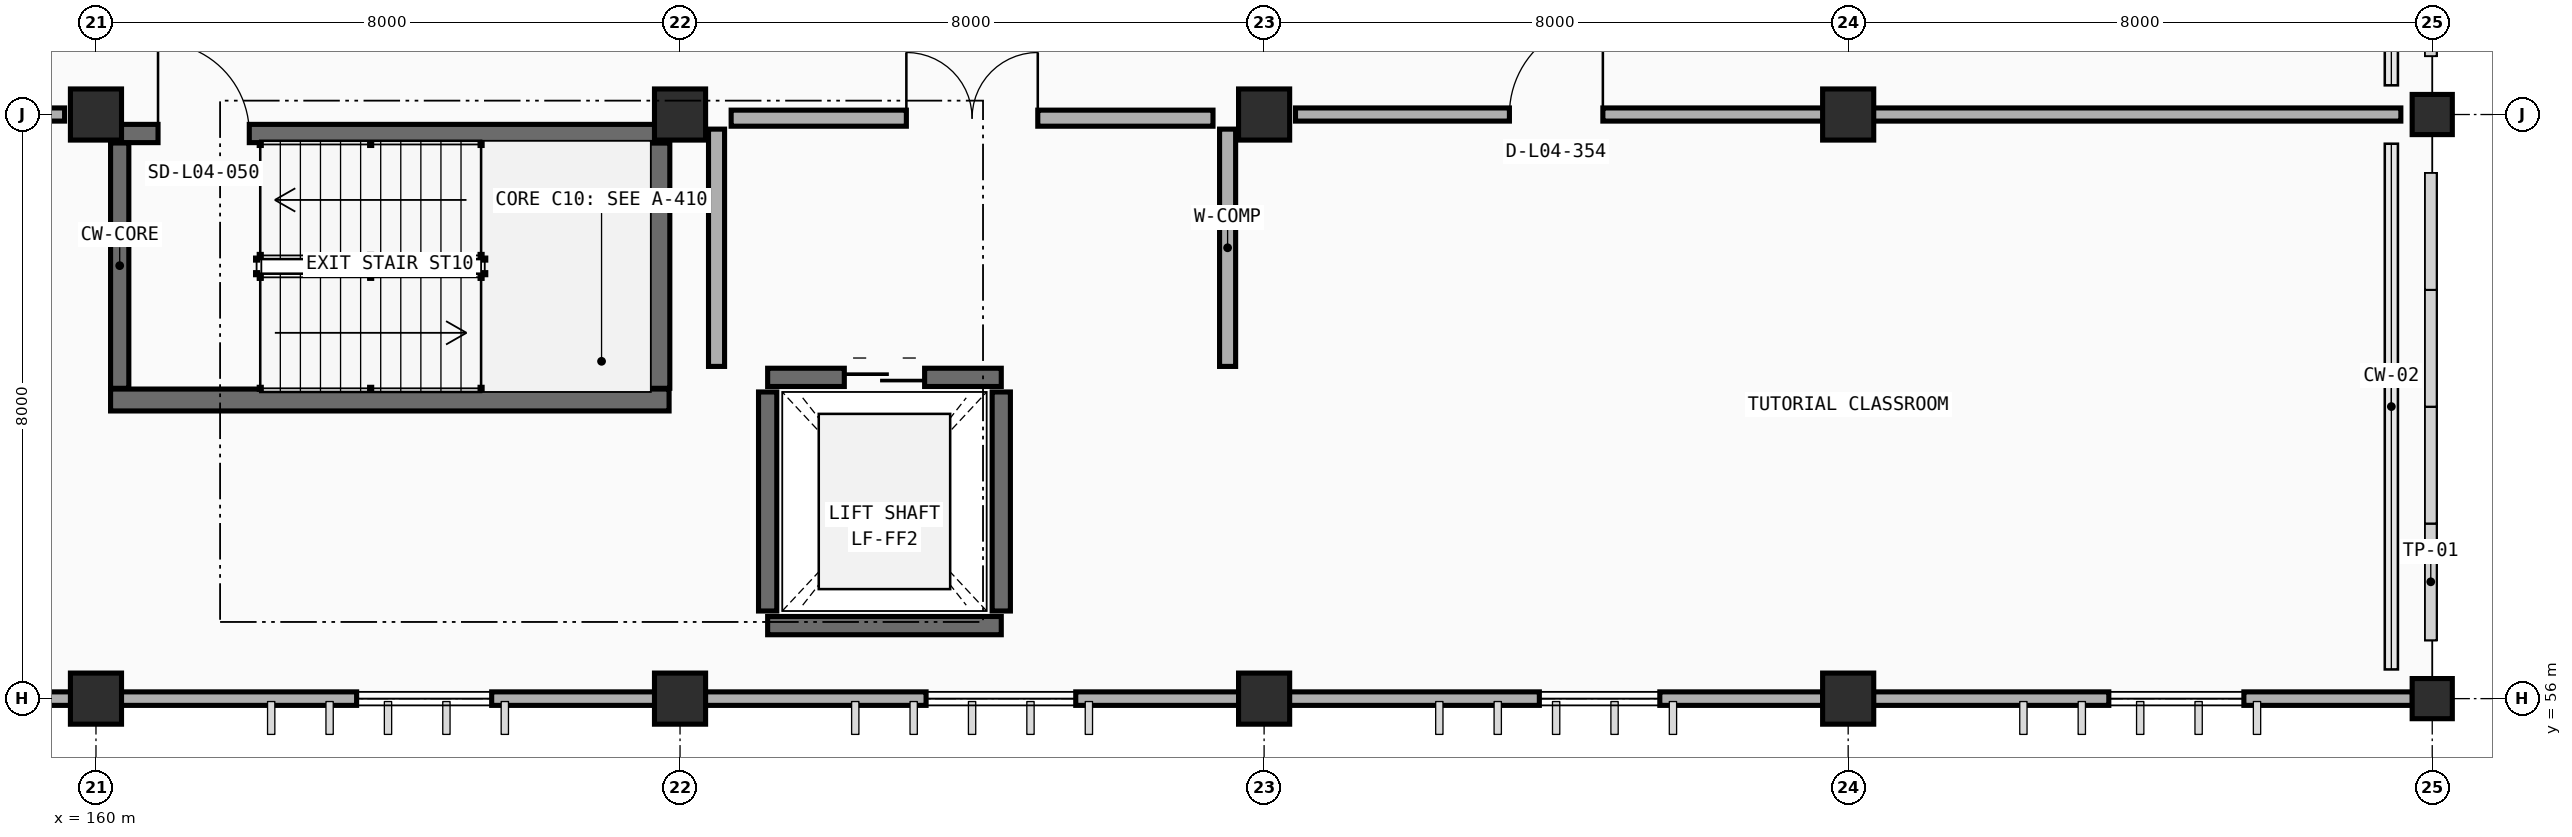
"""IFC4 building model, lengths in metres.
Left out: names, types, materials, properties, quantities, classifications, styles, units other than length and angle.
Written with IfcOpenShell. Run it as: python <this file> out.ifc"""

import sys

from ifc_helpers import new_model, si_unit, direction, frame, frame_2d, origin, origin_2d, place, context, subcontext, project, spatial, rectangle, extrude, element, fill, save


model = new_model("IFC4")
c1 = context("Model", 3, precision=1e-05, world=origin(), true_north=direction((0.0, 1.0)))
c2 = subcontext(c1, "Body", "Model", "MODEL_VIEW")
j1 = project(units=[si_unit("LENGTHUNIT", "METRE"), si_unit("PLANEANGLEUNIT", "RADIAN")], contexts=[c1])
p1 = place(None, origin())
s1 = spatial("IfcSite", under=j1, at=p1, CompositionType="ELEMENT")
p2 = place(p1, origin())
s2 = spatial("IfcBuilding", under=s1, at=p2, CompositionType="ELEMENT")
p3 = place(p2, frame((0.0, 0.0, 13.8)))
s3 = spatial("IfcBuildingStorey", under=s2, at=p3, CompositionType="ELEMENT", Elevation=13.8)
for number, where, z_axis, x_axis in (
    (1, (160.0, 56.0, 0.0), (0.0, 0.0, 1.0), (1.0, 0.0, 0.0)),
    (2, (168.0, 56.0, 0.0), (0.0, 0.0, 1.0), (1.0, 0.0, 0.0)),
    (3, (176.0, 56.0, 0.0), (0.0, 0.0, 1.0), (1.0, 0.0, 0.0)),
    (4, (184.0, 56.0, 0.0), (0.0, 0.0, 1.0), (1.0, 0.0, 0.0)),
):
    element("IfcColumn", number, at=place(p3, frame(where, z_axis=z_axis, x_axis=x_axis)), inside=s3, PredefinedType="COLUMN", context=c2, shape_type="SweptSolid", body=[
        extrude(rectangle(XDim=0.7, YDim=0.7, at=origin_2d()), origin(), (0.0, 0.0, 1.0), 4.2),
    ])
p4 = place(p3, frame((192.0, 56.0, 0.0), z_axis=(0.0, 0.0, 1.0), x_axis=(1.0, 0.0, 0.0)))
e5 = element("IfcColumn", 5, at=p4, inside=s3, PredefinedType="COLUMN", context=c2, shape_type="SweptSolid", body=[
    extrude(rectangle(XDim=0.55, YDim=0.55, at=origin_2d()), origin(), (0.0, 0.0, 1.0), 4.2),
])
for number, where, z_axis, x_axis in (
    (6, (160.0, 64.0, 0.0), (0.0, 0.0, 1.0), (1.0, 0.0, 0.0)),
    (7, (168.0, 64.0, 0.0), (0.0, 0.0, 1.0), (1.0, 0.0, 0.0)),
    (8, (176.0, 64.0, 0.0), (0.0, 0.0, 1.0), (1.0, 0.0, 0.0)),
    (9, (184.0, 64.0, 0.0), (0.0, 0.0, 1.0), (1.0, 0.0, 0.0)),
):
    element("IfcColumn", number, at=place(p3, frame(where, z_axis=z_axis, x_axis=x_axis)), inside=s3, PredefinedType="COLUMN", context=c2, shape_type="SweptSolid", body=[
        extrude(rectangle(XDim=0.7, YDim=0.7, at=origin_2d()), origin(), (0.0, 0.0, 1.0), 4.2),
    ])
p5 = place(p3, frame((192.0, 64.0, 0.0), z_axis=(0.0, 0.0, 1.0), x_axis=(1.0, 0.0, 0.0)))
e10 = element("IfcColumn", 10, at=p5, inside=s3, PredefinedType="COLUMN", context=c2, shape_type="SweptSolid", body=[
    extrude(rectangle(XDim=0.55, YDim=0.55, at=origin_2d()), origin(), (0.0, 0.0, 1.0), 4.2),
])
p6 = place(p3, frame((159.653, 56.0, 0.0), z_axis=(0.0, 0.0, 1.0), x_axis=(-1.0, 0.0, 0.0)))
e11 = element("IfcWall", 11, at=p6, inside=s3, PredefinedType="STANDARD", context=c2, shape_type="SweptSolid", body=[
    extrude(rectangle(XDim=7.306, YDim=0.185, at=frame_2d((3.653, 0.0))), origin(), (0.0, 0.0, 1.0), 3.325),
])
p7 = place(p6, frame((2.233, 0.0, 0.9)))
e12 = element("IfcOpeningElement", 12, at=p7, cuts=e11, PredefinedType="OPENING", context=c2, shape_type="SweptSolid", body=[
    extrude(rectangle(XDim=1.65, YDim=2.0, at=frame_2d((0.825, 1.0))), frame((0.0, 0.103, 0.0), z_axis=(0.0, -1.0, 0.0), x_axis=(1.0, 0.0, 0.0)), (0.0, 0.0, 1.0), 0.205),
])
p8 = place(p3, frame((167.653, 56.0, 0.0), z_axis=(0.0, 0.0, 1.0), x_axis=(-1.0, 0.0, 0.0)))
e13 = element("IfcWall", 13, at=p8, inside=s3, PredefinedType="STANDARD", context=c2, shape_type="SweptSolid", body=[
    extrude(rectangle(XDim=7.306, YDim=0.185, at=frame_2d((3.653, 0.0))), origin(), (0.0, 0.0, 1.0), 3.325),
])
p9 = place(p8, frame((2.233, 0.0, 0.9)))
e14 = element("IfcOpeningElement", 14, at=p9, cuts=e13, PredefinedType="OPENING", context=c2, shape_type="SweptSolid", body=[
    extrude(rectangle(XDim=1.85, YDim=2.0, at=frame_2d((0.925, 1.0))), frame((0.0, 0.103, 0.0), z_axis=(0.0, -1.0, 0.0), x_axis=(1.0, 0.0, 0.0)), (0.0, 0.0, 1.0), 0.205),
])
p10 = place(p3, frame((175.653, 56.0, 0.0), z_axis=(0.0, 0.0, 1.0), x_axis=(-1.0, 0.0, 0.0)))
e15 = element("IfcWall", 15, at=p10, inside=s3, PredefinedType="STANDARD", context=c2, shape_type="SweptSolid", body=[
    extrude(rectangle(XDim=7.306, YDim=0.185, at=frame_2d((3.653, 0.0))), origin(), (0.0, 0.0, 1.0), 3.325),
])
p11 = place(p10, frame((2.233, 0.0, 0.9)))
e16 = element("IfcOpeningElement", 16, at=p11, cuts=e15, PredefinedType="OPENING", context=c2, shape_type="SweptSolid", body=[
    extrude(rectangle(XDim=2.05, YDim=2.0, at=frame_2d((1.025, 1.0))), frame((0.0, 0.103, 0.0), z_axis=(0.0, -1.0, 0.0), x_axis=(1.0, 0.0, 0.0)), (0.0, 0.0, 1.0), 0.205),
])
p12 = place(p3, frame((183.653, 56.0, 0.0), z_axis=(0.0, 0.0, 1.0), x_axis=(-1.0, 0.0, 0.0)))
e17 = element("IfcWall", 17, at=p12, inside=s3, PredefinedType="STANDARD", context=c2, shape_type="SweptSolid", body=[
    extrude(rectangle(XDim=7.306, YDim=0.185, at=frame_2d((3.653, 0.0))), origin(), (0.0, 0.0, 1.0), 3.325),
])
p13 = place(p12, frame((2.233, 0.0, 0.9)))
e18 = element("IfcOpeningElement", 18, at=p13, cuts=e17, PredefinedType="OPENING", context=c2, shape_type="SweptSolid", body=[
    extrude(rectangle(XDim=1.65, YDim=2.0, at=frame_2d((0.825, 1.0))), frame((0.0, 0.103, 0.0), z_axis=(0.0, -1.0, 0.0), x_axis=(1.0, 0.0, 0.0)), (0.0, 0.0, 1.0), 0.205),
])
p14 = place(p3, frame((191.728, 56.0, 0.0), z_axis=(0.0, 0.0, 1.0), x_axis=(-1.0, 0.0, 0.0)))
e19 = element("IfcWall", 19, at=p14, inside=s3, PredefinedType="STANDARD", context=c2, shape_type="SweptSolid", body=[
    extrude(rectangle(XDim=7.381, YDim=0.185, at=frame_2d((3.69, 0.0))), origin(), (0.0, 0.0, 1.0), 3.325),
])
p15 = place(p14, frame((2.308, 0.0, 0.9)))
e20 = element("IfcOpeningElement", 20, at=p15, cuts=e19, PredefinedType="OPENING", context=c2, shape_type="SweptSolid", body=[
    extrude(rectangle(XDim=1.85, YDim=2.0, at=frame_2d((0.925, 1.0))), frame((0.0, 0.103, 0.0), z_axis=(0.0, -1.0, 0.0), x_axis=(1.0, 0.0, 0.0)), (0.0, 0.0, 1.0), 0.205),
])
for number, where, z_axis, x_axis in (
    (21, (191.76, 56.22, 0.0), (0.0, 0.0, 1.0), (-1.0, 0.0, 0.0)),
    (22, (191.76, 63.78, 0.0), (0.0, 0.0, 1.0), (-1.0, 0.0, 0.0)),
    (23, (191.76, 64.22, 0.0), (0.0, 0.0, 1.0), (-1.0, 0.0, 0.0)),
):
    element("IfcWall", number, at=place(p3, frame(where, z_axis=z_axis, x_axis=x_axis)), inside=s3, PredefinedType="PARAPET", context=c2, shape_type="SweptSolid", body=[
        extrude(rectangle(XDim=0.32, YDim=0.2, at=frame_2d((0.16, 0.0))), origin(), (0.0, 0.0, 1.0), 3.35),
    ])
p16 = place(p3, frame((160.2, 60.09, 0.0), z_axis=(0.0, 0.0, 1.0), x_axis=(1.0, 0.0, 0.0)))
e24 = element("IfcWall", 24, at=p16, inside=s3, PredefinedType="SHEAR", context=c2, shape_type="SweptSolid", body=[
    extrude(rectangle(XDim=7.65, YDim=0.3, at=frame_2d((3.825, 0.0))), origin(), (0.0, 0.0, 1.0), 4.2),
])
p17 = place(p3, frame((167.71, 60.25, 0.0), z_axis=(0.0, 0.0, 1.0), x_axis=(0.0, 1.0, 0.0)))
e25 = element("IfcWall", 25, at=p17, inside=s3, PredefinedType="SHEAR", context=c2, shape_type="SweptSolid", body=[
    extrude(rectangle(XDim=3.36, YDim=0.3, at=frame_2d((1.68, 0.0))), origin(), (0.0, 0.0, 1.0), 4.2),
])
p18 = place(p3, frame((160.2, 63.74, 0.0), z_axis=(0.0, 0.0, 1.0), x_axis=(1.0, 0.0, 0.0)))
e26 = element("IfcWall", 26, at=p18, inside=s3, PredefinedType="SOLIDWALL", context=c2, shape_type="SweptSolid", body=[
    extrude(rectangle(XDim=7.65, YDim=0.25, at=frame_2d((3.825, 0.0))), origin(), (0.0, 0.0, 1.0), 4.2),
])
p19 = place(p18, frame((0.65, 0.0, 0.0)))
e27 = element("IfcOpeningElement", 27, at=p19, cuts=e26, PredefinedType="OPENING", context=c2, shape_type="SweptSolid", body=[
    extrude(rectangle(XDim=1.25, YDim=2.15, at=frame_2d((0.625, 1.075))), frame((0.0, 0.135, 0.0), z_axis=(0.0, -1.0, 0.0), x_axis=(1.0, 0.0, 0.0)), (0.0, 0.0, 1.0), 0.27),
])
p20 = place(p3, frame((160.325, 60.25, 0.0), z_axis=(0.0, 0.0, 1.0), x_axis=(0.0, 1.0, 0.0)))
e28 = element("IfcWall", 28, at=p20, inside=s3, PredefinedType="SOLIDWALL", context=c2, shape_type="SweptSolid", body=[
    extrude(rectangle(XDim=3.36, YDim=0.25, at=frame_2d((1.68, 0.0))), origin(), (0.0, 0.0, 1.0), 4.2),
])
p21 = place(p3, frame((169.2, 57.0, 0.0), z_axis=(0.0, 0.0, 1.0), x_axis=(1.0, 0.0, 0.0)))
e29 = element("IfcWall", 29, at=p21, inside=s3, PredefinedType="SOLIDWALL", context=c2, shape_type="SweptSolid", body=[
    extrude(rectangle(XDim=3.2, YDim=0.25, at=frame_2d((1.6, 0.0))), origin(), (0.0, 0.0, 1.0), 4.2),
])
p22 = place(p3, frame((169.2, 60.4, 0.0), z_axis=(0.0, 0.0, 1.0), x_axis=(1.0, 0.0, 0.0)))
e30 = element("IfcWall", 30, at=p22, inside=s3, PredefinedType="SOLIDWALL", context=c2, shape_type="SweptSolid", body=[
    extrude(rectangle(XDim=3.2, YDim=0.25, at=frame_2d((1.6, 0.0))), origin(), (0.0, 0.0, 1.0), 4.2),
])
p23 = place(p22, frame((1.05, 0.0, 0.0)))
e31 = element("IfcOpeningElement", 31, at=p23, cuts=e30, PredefinedType="OPENING", context=c2, shape_type="SweptSolid", body=[
    extrude(rectangle(XDim=1.1, YDim=2.15, at=frame_2d((0.55, 1.075))), frame((0.0, 0.135, 0.0), z_axis=(0.0, -1.0, 0.0), x_axis=(1.0, 0.0, 0.0)), (0.0, 0.0, 1.0), 0.27),
])
for number, where, z_axis, x_axis in (
    (32, (169.2, 57.2, 0.0), (0.0, 0.0, 1.0), (0.0, 1.0, 0.0)),
    (33, (172.4, 57.2, 0.0), (0.0, 0.0, 1.0), (0.0, 1.0, 0.0)),
):
    element("IfcWall", number, at=place(p3, frame(where, z_axis=z_axis, x_axis=x_axis)), inside=s3, PredefinedType="SOLIDWALL", context=c2, shape_type="SweptSolid", body=[
        extrude(rectangle(XDim=3.0, YDim=0.25, at=frame_2d((1.5, 0.0))), origin(), (0.0, 0.0, 1.0), 4.2),
    ])
p24 = place(p3, frame((168.7, 63.95, 0.0), z_axis=(0.0, 0.0, 1.0), x_axis=(1.0, 0.0, 0.0)))
e34 = element("IfcWall", 34, at=p24, inside=s3, PredefinedType="PARTITIONING", context=c2, shape_type="SweptSolid", body=[
    extrude(rectangle(XDim=6.6, YDim=0.22, at=frame_2d((3.3, 0.0))), origin(), (0.0, 0.0, 1.0), 3.275),
])
p25 = place(p24, frame((2.4, 0.0, 0.0)))
e35 = element("IfcOpeningElement", 35, at=p25, cuts=e34, PredefinedType="OPENING", context=c2, shape_type="SweptSolid", body=[
    extrude(rectangle(XDim=1.8, YDim=2.2, at=frame_2d((0.9, 1.1))), frame((0.0, 0.12, 0.0), z_axis=(0.0, -1.0, 0.0), x_axis=(1.0, 0.0, 0.0)), (0.0, 0.0, 1.0), 0.24),
])
for number, where, z_axis, x_axis in (
    (36, (168.5, 60.55, 0.0), (0.0, 0.0, 1.0), (0.0, 1.0, 0.0)),
    (37, (175.5, 60.55, 0.0), (0.0, 0.0, 1.0), (0.0, 1.0, 0.0)),
):
    element("IfcWall", number, at=place(p3, frame(where, z_axis=z_axis, x_axis=x_axis)), inside=s3, PredefinedType="PARTITIONING", context=c2, shape_type="SweptSolid", body=[
        extrude(rectangle(XDim=3.25, YDim=0.22, at=frame_2d((1.625, 0.0))), origin(), (0.0, 0.0, 1.0), 3.225),
    ])
p26 = place(p3, frame((136.43, 64.0, 0.0), z_axis=(0.0, 0.0, 1.0), x_axis=(1.0, 0.0, 0.0)))
e38 = element("IfcWall", 38, at=p26, inside=s3, PredefinedType="PARTITIONING", context=c2, shape_type="SweptSolid", body=[
    extrude(rectangle(XDim=23.14, YDim=0.18, at=frame_2d((11.57, 0.0))), origin(), (0.0, 0.0, 1.0), 3.275),
])
p27 = place(p26, frame((2.66, 0.0, 0.0)))
e39 = element("IfcOpeningElement", 39, at=p27, cuts=e38, PredefinedType="OPENING", context=c2, shape_type="SweptSolid", body=[
    extrude(rectangle(XDim=1.82, YDim=2.25, at=frame_2d((0.91, 1.125))), frame((0.0, 0.1, 0.0), z_axis=(0.0, -1.0, 0.0), x_axis=(1.0, 0.0, 0.0)), (0.0, 0.0, 1.0), 0.2),
])
p28 = place(p3, frame((176.43, 64.0, 0.0), z_axis=(0.0, 0.0, 1.0), x_axis=(1.0, 0.0, 0.0)))
e40 = element("IfcWall", 40, at=p28, inside=s3, PredefinedType="PARTITIONING", context=c2, shape_type="SweptSolid", body=[
    extrude(rectangle(XDim=15.14, YDim=0.18, at=frame_2d((7.57, 0.0))), origin(), (0.0, 0.0, 1.0), 3.275),
])
p29 = place(p28, frame((2.93, 0.0, 0.0)))
e41 = element("IfcOpeningElement", 41, at=p29, cuts=e40, PredefinedType="OPENING", context=c2, shape_type="SweptSolid", body=[
    extrude(rectangle(XDim=1.28, YDim=2.2, at=frame_2d((0.64, 1.1))), frame((0.0, 0.1, 0.0), z_axis=(0.0, -1.0, 0.0), x_axis=(1.0, 0.0, 0.0)), (0.0, 0.0, 1.0), 0.2),
])
p30 = place(p9, origin())
e42 = element("IfcWindow", 42, at=p30, inside=s3, PartitioningType="DOUBLE_PANEL_VERTICAL", PredefinedType="WINDOW", context=c2, shape_type="SweptSolid", body=[
    extrude(rectangle(XDim=1.85, YDim=2.0, at=frame_2d((0.925, 1.0))), frame((0.0, 0.03, 0.0), z_axis=(0.0, -1.0, 0.0), x_axis=(1.0, 0.0, 0.0)), (0.0, 0.0, 1.0), 0.06),
])
fill(e14, e42)
p31 = place(p11, origin())
e43 = element("IfcWindow", 43, at=p31, inside=s3, PartitioningType="DOUBLE_PANEL_VERTICAL", PredefinedType="WINDOW", context=c2, shape_type="SweptSolid", body=[
    extrude(rectangle(XDim=2.05, YDim=2.0, at=frame_2d((1.025, 1.0))), frame((0.0, 0.03, 0.0), z_axis=(0.0, -1.0, 0.0), x_axis=(1.0, 0.0, 0.0)), (0.0, 0.0, 1.0), 0.06),
])
fill(e16, e43)
p32 = place(p13, origin())
e44 = element("IfcWindow", 44, at=p32, inside=s3, PartitioningType="DOUBLE_PANEL_VERTICAL", PredefinedType="WINDOW", context=c2, shape_type="SweptSolid", body=[
    extrude(rectangle(XDim=1.65, YDim=2.0, at=frame_2d((0.825, 1.0))), frame((0.0, 0.03, 0.0), z_axis=(0.0, -1.0, 0.0), x_axis=(1.0, 0.0, 0.0)), (0.0, 0.0, 1.0), 0.06),
])
fill(e18, e44)
p33 = place(p15, origin())
e45 = element("IfcWindow", 45, at=p33, inside=s3, PartitioningType="DOUBLE_PANEL_VERTICAL", PredefinedType="WINDOW", context=c2, shape_type="SweptSolid", body=[
    extrude(rectangle(XDim=1.85, YDim=2.0, at=frame_2d((0.925, 1.0))), frame((0.0, 0.03, 0.0), z_axis=(0.0, -1.0, 0.0), x_axis=(1.0, 0.0, 0.0)), (0.0, 0.0, 1.0), 0.06),
])
fill(e20, e45)
p34 = place(p19, origin())
e46 = element("IfcDoor", 46, at=p34, inside=s3, OperationType="SINGLE_SWING_LEFT", PredefinedType="DOOR", context=c2, shape_type="SweptSolid", body=[
    extrude(rectangle(XDim=1.25, YDim=2.15, at=frame_2d((0.625, 1.075))), frame((0.0, 0.025, 0.0), z_axis=(0.0, -1.0, 0.0), x_axis=(1.0, 0.0, 0.0)), (0.0, 0.0, 1.0), 0.05),
])
fill(e27, e46)
p35 = place(p23, origin())
e47 = element("IfcDoor", 47, at=p35, inside=s3, OperationType="DOUBLE_DOOR_SLIDING", PredefinedType="DOOR", context=c2, shape_type="SweptSolid", body=[
    extrude(rectangle(XDim=1.1, YDim=2.15, at=frame_2d((0.55, 1.075))), frame((0.0, 0.025, 0.0), z_axis=(0.0, -1.0, 0.0), x_axis=(1.0, 0.0, 0.0)), (0.0, 0.0, 1.0), 0.05),
])
fill(e31, e47)
p36 = place(p25, origin())
e48 = element("IfcDoor", 48, at=p36, inside=s3, OperationType="DOUBLE_DOOR_SINGLE_SWING", PredefinedType="DOOR", context=c2, shape_type="SweptSolid", body=[
    extrude(rectangle(XDim=1.8, YDim=2.2, at=frame_2d((0.9, 1.1))), frame((0.0, 0.025, 0.0), z_axis=(0.0, -1.0, 0.0), x_axis=(1.0, 0.0, 0.0)), (0.0, 0.0, 1.0), 0.05),
])
fill(e35, e48)
p37 = place(p29, origin())
e49 = element("IfcDoor", 49, at=p37, inside=s3, OperationType="SINGLE_SWING_RIGHT", PredefinedType="DOOR", context=c2, shape_type="SweptSolid", body=[
    extrude(rectangle(XDim=1.28, YDim=2.2, at=frame_2d((0.64, 1.1))), frame((0.0, 0.025, 0.0), z_axis=(0.0, -1.0, 0.0), x_axis=(1.0, 0.0, 0.0)), (0.0, 0.0, 1.0), 0.05),
])
fill(e41, e49)
save(model, sys.argv[1])
